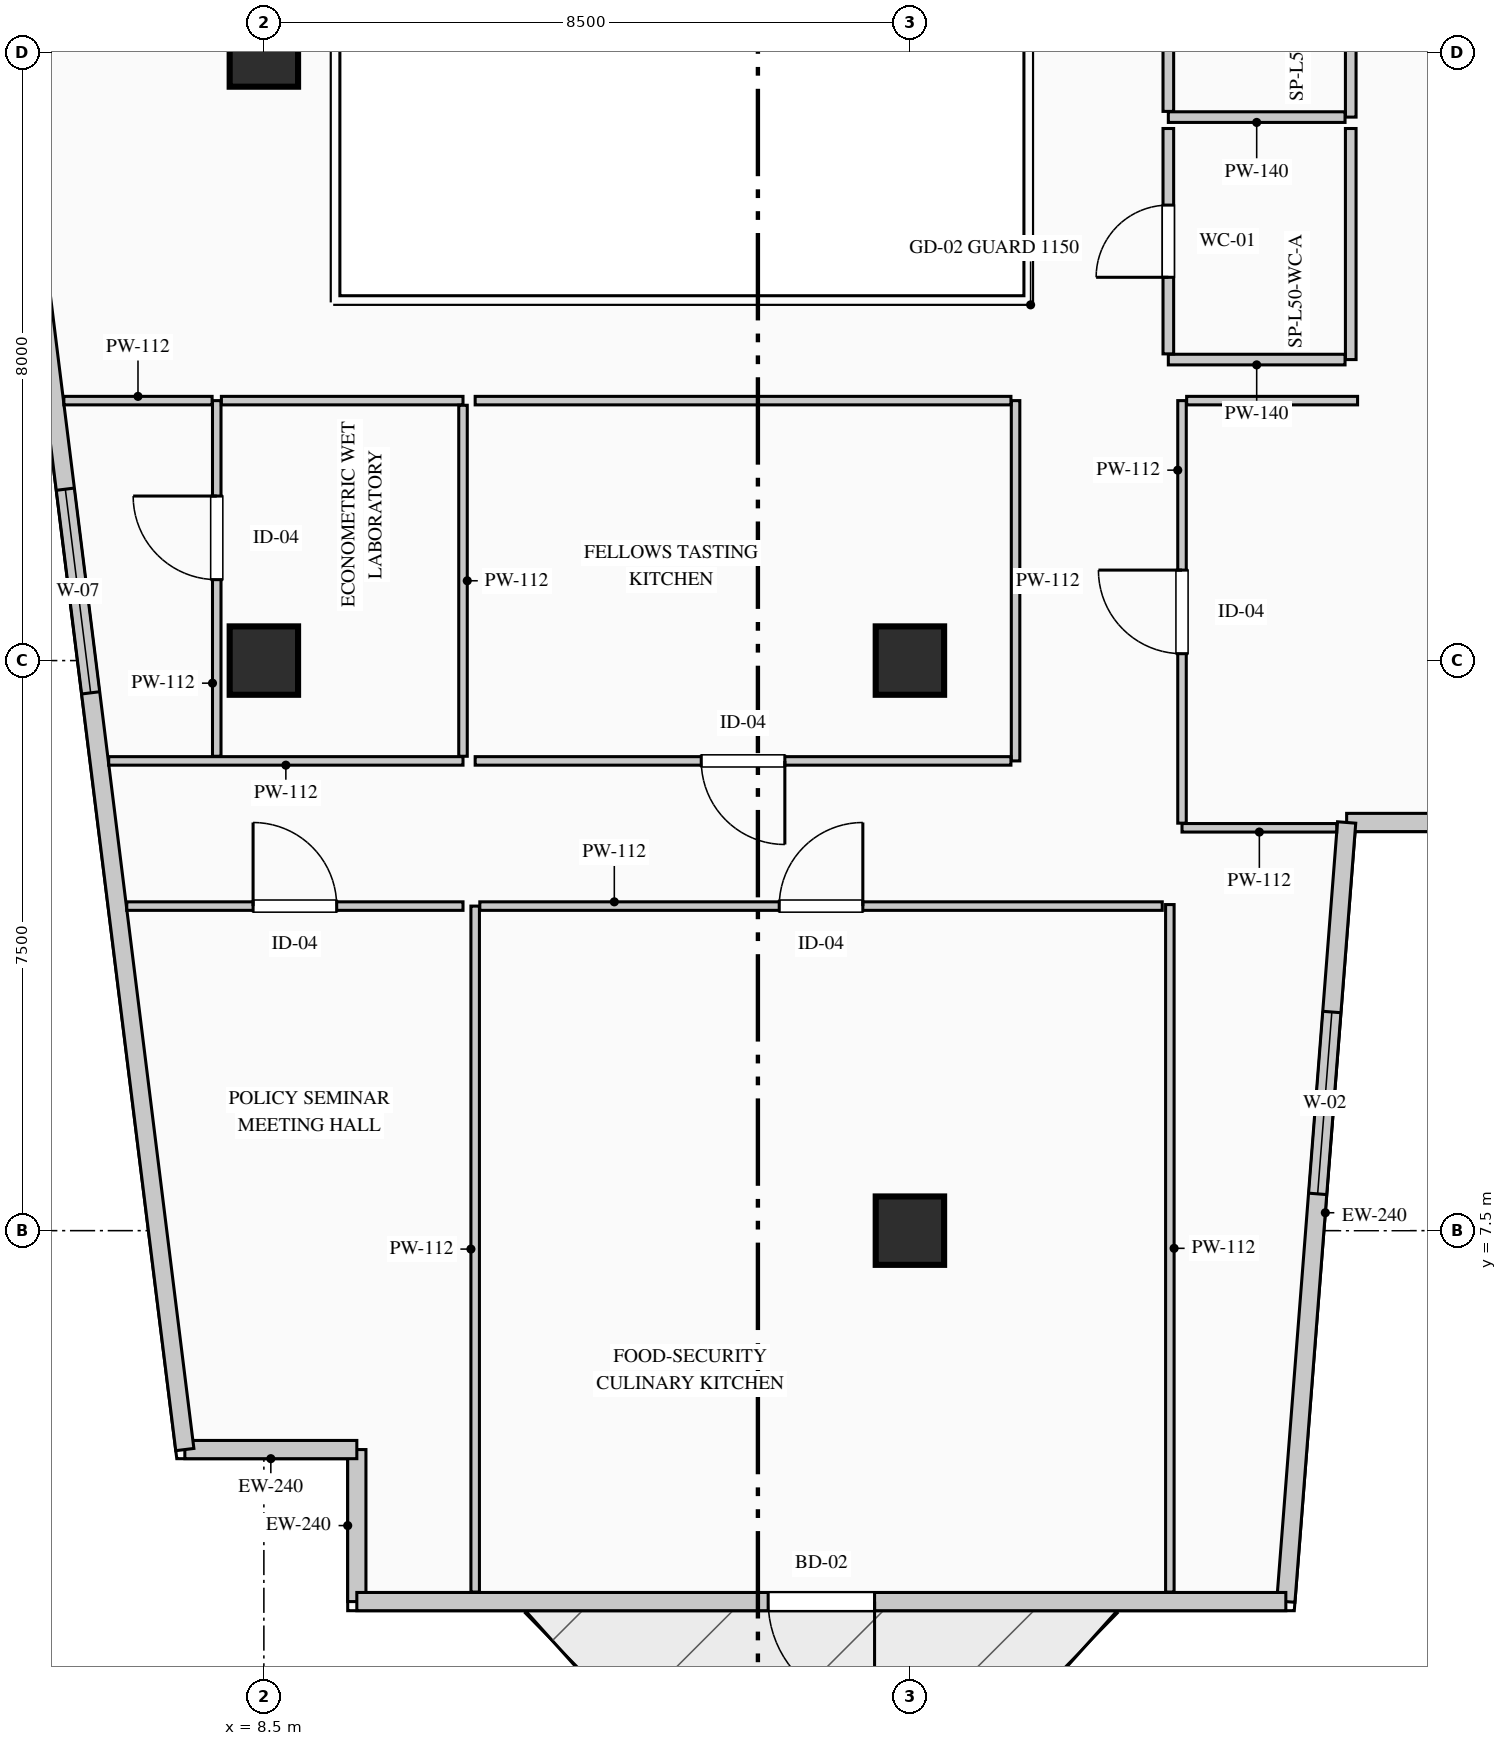
"""IFC4 building model, lengths in metres.
Left out: names, types, materials, properties, quantities, classifications, styles, units other than length and angle.
Written with IfcOpenShell. Run it as: python <this file> out.ifc"""

import sys

from ifc_helpers import new_model, si_unit, direction, frame, frame_2d, origin, origin_2d, place, context, subcontext, project, spatial, rectangle, extrude, element, fill, save


model = new_model("IFC4")
c1 = context("Model", 3, precision=1e-05, world=origin(), true_north=direction((0.0, 1.0)))
c2 = subcontext(c1, "Body", "Model", "MODEL_VIEW")
j1 = project(units=[si_unit("LENGTHUNIT", "METRE"), si_unit("PLANEANGLEUNIT", "RADIAN")], contexts=[c1])
p1 = place(None, origin())
s1 = spatial("IfcSite", under=j1, at=p1, CompositionType="ELEMENT")
p2 = place(p1, origin())
s2 = spatial("IfcBuilding", under=s1, at=p2, CompositionType="ELEMENT")
p3 = place(p2, frame((0.0, 0.0, 211.4)))
s3 = spatial("IfcBuildingStorey", under=s2, at=p3, CompositionType="ELEMENT", Elevation=211.4)
for number, where, z_axis, x_axis in (
    (1, (8.5, 15.0, 0.0), (0.0, 0.0, 1.0), (1.0, 0.0, 0.0)),
    (2, (8.5, 23.0, 0.0), (0.0, 0.0, 1.0), (1.0, 0.0, 0.0)),
    (3, (17.0, 7.5, 0.0), (0.0, 0.0, 1.0), (1.0, 0.0, 0.0)),
    (4, (17.0, 15.0, 0.0), (0.0, 0.0, 1.0), (1.0, 0.0, 0.0)),
):
    element("IfcColumn", number, at=place(p3, frame(where, z_axis=z_axis, x_axis=x_axis)), inside=s3, PredefinedType="COLUMN", context=c2, shape_type="SweptSolid", body=[
        extrude(rectangle(XDim=0.9, YDim=0.9, at=origin_2d()), origin(), (0.0, 0.0, 1.0), 3.95),
    ])
p4 = place(p3, frame((9.723, 2.62, 0.0), z_axis=(0.0, 0.0, 1.0), x_axis=(0.0, 1.0, 0.0)))
e5 = element("IfcWall", 5, at=p4, inside=s3, PredefinedType="STANDARD", context=c2, shape_type="SweptSolid", body=[
    extrude(rectangle(XDim=2.0, YDim=0.24, at=frame_2d((1.0, 0.0))), origin(), (0.0, 0.0, 1.0), 3.7),
])
p5 = place(p3, frame((9.723, 4.62, 0.0), z_axis=(0.0, 0.0, 1.0), x_axis=(-1.0, 0.0, 0.0)))
e6 = element("IfcWall", 6, at=p5, inside=s3, PredefinedType="STANDARD", context=c2, shape_type="SweptSolid", body=[
    extrude(rectangle(XDim=2.263, YDim=0.24, at=frame_2d((1.131, 0.0))), origin(), (0.0, 0.0, 1.0), 3.7),
])
p6 = place(p3, frame((7.46, 4.62, 0.0), z_axis=(0.0, 0.0, 1.0), x_axis=(-0.123515576323, 0.992342633573, 0.0)))
e7 = element("IfcWall", 7, at=p6, inside=s3, PredefinedType="STANDARD", context=c2, shape_type="SweptSolid", body=[
    extrude(rectangle(XDim=37.043, YDim=0.24, at=frame_2d((18.522, 0.0))), origin(), (0.0, 0.0, 1.0), 3.7),
])
p7 = place(p6, frame((10.032, 0.0, 0.9)))
e8 = element("IfcOpeningElement", 8, at=p7, cuts=e7, PredefinedType="OPENING", context=c2, shape_type="SweptSolid", body=[
    extrude(rectangle(XDim=2.7, YDim=2.1, at=frame_2d((1.35, 1.05))), frame((0.0, 0.13, 0.0), z_axis=(0.0, -1.0, 0.0), x_axis=(1.0, 0.0, 0.0)), (0.0, 0.0, 1.0), 0.26),
])
p8 = place(p3, frame((29.581, 12.87, 0.0), z_axis=(0.0, 0.0, 1.0), x_axis=(-1.0, 0.0, 0.0)))
e9 = element("IfcWall", 9, at=p8, inside=s3, PredefinedType="STANDARD", context=c2, shape_type="SweptSolid", body=[
    extrude(rectangle(XDim=6.834, YDim=0.24, at=frame_2d((3.417, 0.0))), origin(), (0.0, 0.0, 1.0), 3.7),
])
p9 = place(p8, frame((1.26, 0.0, 0.9)))
e10 = element("IfcOpeningElement", 10, at=p9, cuts=e9, PredefinedType="OPENING", context=c2, shape_type="SweptSolid", body=[
    extrude(rectangle(XDim=2.4, YDim=2.1, at=frame_2d((1.2, 1.05))), frame((0.0, 0.13, 0.0), z_axis=(0.0, -1.0, 0.0), x_axis=(1.0, 0.0, 0.0)), (0.0, 0.0, 1.0), 0.26),
])
p10 = place(p3, frame((22.746, 12.87, 0.0), z_axis=(0.0, 0.0, 1.0), x_axis=(-0.077816860153, -0.996967670627, 0.0)))
e11 = element("IfcWall", 11, at=p10, inside=s3, PredefinedType="STANDARD", context=c2, shape_type="SweptSolid", body=[
    extrude(rectangle(XDim=10.281, YDim=0.24, at=frame_2d((5.141, 0.0))), origin(), (0.0, 0.0, 1.0), 3.7),
])
p11 = place(p10, frame((2.501, 0.0, 0.9)))
e12 = element("IfcOpeningElement", 12, at=p11, cuts=e11, PredefinedType="OPENING", context=c2, shape_type="SweptSolid", body=[
    extrude(rectangle(XDim=2.4, YDim=2.1, at=frame_2d((1.2, 1.05))), frame((0.0, 0.13, 0.0), z_axis=(0.0, -1.0, 0.0), x_axis=(1.0, 0.0, 0.0)), (0.0, 0.0, 1.0), 0.26),
])
p12 = place(p3, frame((21.946, 2.62, 0.0), z_axis=(0.0, 0.0, 1.0), x_axis=(-1.0, 0.0, 0.0)))
e13 = element("IfcWall", 13, at=p12, inside=s3, PredefinedType="STANDARD", context=c2, shape_type="SweptSolid", body=[
    extrude(rectangle(XDim=12.223, YDim=0.24, at=frame_2d((6.112, 0.0))), origin(), (0.0, 0.0, 1.0), 3.7),
])
p13 = place(p12, frame((5.411, 0.0, 0.0)))
e14 = element("IfcOpeningElement", 14, at=p13, cuts=e13, PredefinedType="OPENING", context=c2, shape_type="SweptSolid", body=[
    extrude(rectangle(XDim=1.4, YDim=2.2, at=frame_2d((0.7, 1.1))), frame((0.0, 0.13, 0.0), z_axis=(0.0, -1.0, 0.0), x_axis=(1.0, 0.0, 0.0)), (0.0, 0.0, 1.0), 0.26),
])
p14 = place(p3, frame((22.8, 25.15, 0.0), z_axis=(0.0, 0.0, 1.0), x_axis=(0.0, -1.0, 0.0)))
e15 = element("IfcWall", 15, at=p14, inside=s3, PredefinedType="PARTITIONING", context=c2, shape_type="SweptSolid", body=[
    extrude(rectangle(XDim=3.0, YDim=0.14, at=frame_2d((1.5, 0.0))), origin(), (0.0, 0.0, 1.0), 3.325),
])
p15 = place(p3, frame((22.725, 22.15, 0.0), z_axis=(0.0, 0.0, 1.0), x_axis=(-1.0, 0.0, 0.0)))
e16 = element("IfcWall", 16, at=p15, inside=s3, PredefinedType="PARTITIONING", context=c2, shape_type="SweptSolid", body=[
    extrude(rectangle(XDim=2.325, YDim=0.14, at=frame_2d((1.163, 0.0))), origin(), (0.0, 0.0, 1.0), 3.7),
])
p16 = place(p3, frame((20.4, 22.225, 0.0), z_axis=(0.0, 0.0, 1.0), x_axis=(0.0, 1.0, 0.0)))
e17 = element("IfcWall", 17, at=p16, inside=s3, PredefinedType="PARTITIONING", context=c2, shape_type="SweptSolid", body=[
    extrude(rectangle(XDim=2.925, YDim=0.14, at=frame_2d((1.462, 0.0))), origin(), (0.0, 0.0, 1.0), 3.7),
])
p17 = place(p16, frame((0.988, 0.0, 0.0)))
e18 = element("IfcOpeningElement", 18, at=p17, cuts=e17, PredefinedType="OPENING", context=c2, shape_type="SweptSolid", body=[
    extrude(rectangle(XDim=0.95, YDim=2.15, at=frame_2d((0.475, 1.075))), frame((0.0, 0.08, 0.0), z_axis=(0.0, -1.0, 0.0), x_axis=(1.0, 0.0, 0.0)), (0.0, 0.0, 1.0), 0.16),
])
p18 = place(p3, frame((22.8, 22.0, 0.0), z_axis=(0.0, 0.0, 1.0), x_axis=(0.0, -1.0, 0.0)))
e19 = element("IfcWall", 19, at=p18, inside=s3, PredefinedType="PARTITIONING", context=c2, shape_type="SweptSolid", body=[
    extrude(rectangle(XDim=3.04, YDim=0.14, at=frame_2d((1.52, 0.0))), origin(), (0.0, 0.0, 1.0), 3.325),
])
p19 = place(p3, frame((22.725, 18.96, 0.0), z_axis=(0.0, 0.0, 1.0), x_axis=(-1.0, 0.0, 0.0)))
e20 = element("IfcWall", 20, at=p19, inside=s3, PredefinedType="PARTITIONING", context=c2, shape_type="SweptSolid", body=[
    extrude(rectangle(XDim=2.325, YDim=0.14, at=frame_2d((1.163, 0.0))), origin(), (0.0, 0.0, 1.0), 3.7),
])
p20 = place(p3, frame((20.4, 19.035, 0.0), z_axis=(0.0, 0.0, 1.0), x_axis=(0.0, 1.0, 0.0)))
e21 = element("IfcWall", 21, at=p20, inside=s3, PredefinedType="PARTITIONING", context=c2, shape_type="SweptSolid", body=[
    extrude(rectangle(XDim=2.965, YDim=0.14, at=frame_2d((1.482, 0.0))), origin(), (0.0, 0.0, 1.0), 3.7),
])
p21 = place(p20, frame((1.008, 0.0, 0.0)))
e22 = element("IfcOpeningElement", 22, at=p21, cuts=e21, PredefinedType="OPENING", context=c2, shape_type="SweptSolid", body=[
    extrude(rectangle(XDim=0.95, YDim=2.15, at=frame_2d((0.475, 1.075))), frame((0.0, 0.08, 0.0), z_axis=(0.0, -1.0, 0.0), x_axis=(1.0, 0.0, 0.0)), (0.0, 0.0, 1.0), 0.16),
])
p22 = place(p3, frame((11.28, 2.745, 0.0), z_axis=(0.0, 0.0, 1.0), x_axis=(0.0, 1.0, 0.0)))
e23 = element("IfcWall", 23, at=p22, inside=s3, PredefinedType="PARTITIONING", context=c2, shape_type="SweptSolid", body=[
    extrude(rectangle(XDim=9.025, YDim=0.112, at=frame_2d((4.512, 0.0))), origin(), (0.0, 0.0, 1.0), 3.7),
])
p23 = place(p3, frame((11.341, 11.77, 0.0), z_axis=(0.0, 0.0, 1.0), x_axis=(1.0, 0.0, 0.0)))
e24 = element("IfcWall", 24, at=p23, inside=s3, PredefinedType="PARTITIONING", context=c2, shape_type="SweptSolid", body=[
    extrude(rectangle(XDim=8.979, YDim=0.112, at=frame_2d((4.49, 0.0))), origin(), (0.0, 0.0, 1.0), 3.7),
])
p24 = place(p23, frame((3.939, 0.0, 0.0)))
e25 = element("IfcOpeningElement", 25, at=p24, cuts=e24, PredefinedType="OPENING", context=c2, shape_type="SweptSolid", body=[
    extrude(rectangle(XDim=1.1, YDim=2.2, at=frame_2d((0.55, 1.1))), frame((0.0, 0.066, 0.0), z_axis=(0.0, -1.0, 0.0), x_axis=(1.0, 0.0, 0.0)), (0.0, 0.0, 1.0), 0.132),
])
p25 = place(p3, frame((20.42, 11.79, 0.0), z_axis=(0.0, 0.0, 1.0), x_axis=(0.0, -1.0, 0.0)))
e26 = element("IfcWall", 26, at=p25, inside=s3, PredefinedType="PARTITIONING", context=c2, shape_type="SweptSolid", body=[
    extrude(rectangle(XDim=9.045, YDim=0.112, at=frame_2d((4.522, 0.0))), origin(), (0.0, 0.0, 1.0), 3.7),
])
p26 = place(p3, frame((6.696, 11.77, 0.0), z_axis=(0.0, 0.0, 1.0), x_axis=(1.0, 0.0, 0.0)))
e27 = element("IfcWall", 27, at=p26, inside=s3, PredefinedType="PARTITIONING", context=c2, shape_type="SweptSolid", body=[
    extrude(rectangle(XDim=4.424, YDim=0.112, at=frame_2d((2.212, 0.0))), origin(), (0.0, 0.0, 1.0), 3.7),
])
p27 = place(p26, frame((1.662, 0.0, 0.0)))
e28 = element("IfcOpeningElement", 28, at=p27, cuts=e27, PredefinedType="OPENING", context=c2, shape_type="SweptSolid", body=[
    extrude(rectangle(XDim=1.1, YDim=2.2, at=frame_2d((0.55, 1.1))), frame((0.0, 0.066, 0.0), z_axis=(0.0, -1.0, 0.0), x_axis=(1.0, 0.0, 0.0)), (0.0, 0.0, 1.0), 0.132),
])
p28 = place(p3, frame((11.12, 13.68, 0.0), z_axis=(0.0, 0.0, 1.0), x_axis=(-1.0, 0.0, 0.0)))
e29 = element("IfcWall", 29, at=p28, inside=s3, PredefinedType="PARTITIONING", context=c2, shape_type="SweptSolid", body=[
    extrude(rectangle(XDim=4.662, YDim=0.112, at=frame_2d((2.331, 0.0))), origin(), (0.0, 0.0, 1.0), 3.7),
])
p29 = place(p3, frame((7.88, 13.741, 0.0), z_axis=(0.0, 0.0, 1.0), x_axis=(0.0, 1.0, 0.0)))
e30 = element("IfcWall", 30, at=p29, inside=s3, PredefinedType="PARTITIONING", context=c2, shape_type="SweptSolid", body=[
    extrude(rectangle(XDim=4.679, YDim=0.112, at=frame_2d((2.339, 0.0))), origin(), (0.0, 0.0, 1.0), 3.7),
])
p30 = place(p29, frame((2.324, 0.0, 0.0)))
e31 = element("IfcOpeningElement", 31, at=p30, cuts=e30, PredefinedType="OPENING", context=c2, shape_type="SweptSolid", body=[
    extrude(rectangle(XDim=1.1, YDim=2.2, at=frame_2d((0.55, 1.1))), frame((0.0, 0.066, 0.0), z_axis=(0.0, -1.0, 0.0), x_axis=(1.0, 0.0, 0.0)), (0.0, 0.0, 1.0), 0.132),
])
p31 = place(p3, frame((5.868, 18.42, 0.0), z_axis=(0.0, 0.0, 1.0), x_axis=(1.0, 0.0, 0.0)))
e32 = element("IfcWall", 32, at=p31, inside=s3, PredefinedType="PARTITIONING", context=c2, shape_type="SweptSolid", body=[
    extrude(rectangle(XDim=1.951, YDim=0.112, at=frame_2d((0.975, 0.0))), origin(), (0.0, 0.0, 1.0), 3.7),
])
p32 = place(p3, frame((7.941, 18.42, 0.0), z_axis=(0.0, 0.0, 1.0), x_axis=(1.0, 0.0, 0.0)))
e33 = element("IfcWall", 33, at=p32, inside=s3, PredefinedType="PARTITIONING", context=c2, shape_type="SweptSolid", body=[
    extrude(rectangle(XDim=3.179, YDim=0.112, at=frame_2d((1.59, 0.0))), origin(), (0.0, 0.0, 1.0), 3.7),
])
p33 = place(p3, frame((11.12, 18.359, 0.0), z_axis=(0.0, 0.0, 1.0), x_axis=(0.0, -1.0, 0.0)))
e34 = element("IfcWall", 34, at=p33, inside=s3, PredefinedType="PARTITIONING", context=c2, shape_type="SweptSolid", body=[
    extrude(rectangle(XDim=4.618, YDim=0.112, at=frame_2d((2.309, 0.0))), origin(), (0.0, 0.0, 1.0), 3.7),
])
p34 = place(p3, frame((18.39, 18.42, 0.0), z_axis=(0.0, 0.0, 1.0), x_axis=(0.0, -1.0, 0.0)))
e35 = element("IfcWall", 35, at=p34, inside=s3, PredefinedType="PARTITIONING", context=c2, shape_type="SweptSolid", body=[
    extrude(rectangle(XDim=4.74, YDim=0.112, at=frame_2d((2.37, 0.0))), origin(), (0.0, 0.0, 1.0), 3.7),
])
p35 = place(p3, frame((18.329, 13.68, 0.0), z_axis=(0.0, 0.0, 1.0), x_axis=(-1.0, 0.0, 0.0)))
e36 = element("IfcWall", 36, at=p35, inside=s3, PredefinedType="PARTITIONING", context=c2, shape_type="SweptSolid", body=[
    extrude(rectangle(XDim=7.049, YDim=0.112, at=frame_2d((3.524, 0.0))), origin(), (0.0, 0.0, 1.0), 3.7),
])
p36 = place(p35, frame((2.975, 0.0, 0.0)))
e37 = element("IfcOpeningElement", 37, at=p36, cuts=e36, PredefinedType="OPENING", context=c2, shape_type="SweptSolid", body=[
    extrude(rectangle(XDim=1.1, YDim=2.2, at=frame_2d((0.55, 1.1))), frame((0.0, 0.066, 0.0), z_axis=(0.0, -1.0, 0.0), x_axis=(1.0, 0.0, 0.0)), (0.0, 0.0, 1.0), 0.132),
])
p37 = place(p3, frame((11.28, 18.42, 0.0), z_axis=(0.0, 0.0, 1.0), x_axis=(1.0, 0.0, 0.0)))
e38 = element("IfcWall", 38, at=p37, inside=s3, PredefinedType="PARTITIONING", context=c2, shape_type="SweptSolid", body=[
    extrude(rectangle(XDim=7.049, YDim=0.112, at=frame_2d((3.524, 0.0))), origin(), (0.0, 0.0, 1.0), 3.7),
])
p38 = place(p3, frame((22.615, 12.8, 0.0), z_axis=(0.0, 0.0, 1.0), x_axis=(-1.0, 0.0, 0.0)))
e39 = element("IfcWall", 39, at=p38, inside=s3, PredefinedType="PARTITIONING", context=c2, shape_type="SweptSolid", body=[
    extrude(rectangle(XDim=2.035, YDim=0.112, at=frame_2d((1.018, 0.0))), origin(), (0.0, 0.0, 1.0), 3.7),
])
p39 = place(p3, frame((20.58, 12.861, 0.0), z_axis=(0.0, 0.0, 1.0), x_axis=(0.0, 1.0, 0.0)))
e40 = element("IfcWall", 40, at=p39, inside=s3, PredefinedType="PARTITIONING", context=c2, shape_type="SweptSolid", body=[
    extrude(rectangle(XDim=5.559, YDim=0.112, at=frame_2d((2.779, 0.0))), origin(), (0.0, 0.0, 1.0), 3.7),
])
p40 = place(p39, frame((2.229, 0.0, 0.0)))
e41 = element("IfcOpeningElement", 41, at=p40, cuts=e40, PredefinedType="OPENING", context=c2, shape_type="SweptSolid", body=[
    extrude(rectangle(XDim=1.1, YDim=2.2, at=frame_2d((0.55, 1.1))), frame((0.0, 0.066, 0.0), z_axis=(0.0, -1.0, 0.0), x_axis=(1.0, 0.0, 0.0)), (0.0, 0.0, 1.0), 0.132),
])
p41 = place(p3, frame((20.641, 18.42, 0.0), z_axis=(0.0, 0.0, 1.0), x_axis=(1.0, 0.0, 0.0)))
e42 = element("IfcWall", 42, at=p41, inside=s3, PredefinedType="PARTITIONING", context=c2, shape_type="SweptSolid", body=[
    extrude(rectangle(XDim=2.249, YDim=0.112, at=frame_2d((1.125, 0.0))), origin(), (0.0, 0.0, 1.0), 3.7),
])
p42 = place(p7, origin())
e43 = element("IfcWindow", 43, at=p42, inside=s3, PartitioningType="DOUBLE_PANEL_VERTICAL", PredefinedType="WINDOW", context=c2, shape_type="SweptSolid", body=[
    extrude(rectangle(XDim=2.7, YDim=2.1, at=frame_2d((1.35, 1.05))), frame((0.0, 0.03, 0.0), z_axis=(0.0, -1.0, 0.0), x_axis=(1.0, 0.0, 0.0)), (0.0, 0.0, 1.0), 0.06),
])
fill(e8, e43)
p43 = place(p11, origin())
e44 = element("IfcWindow", 44, at=p43, inside=s3, PartitioningType="DOUBLE_PANEL_VERTICAL", PredefinedType="WINDOW", context=c2, shape_type="SweptSolid", body=[
    extrude(rectangle(XDim=2.4, YDim=2.1, at=frame_2d((1.2, 1.05))), frame((0.0, 0.03, 0.0), z_axis=(0.0, -1.0, 0.0), x_axis=(1.0, 0.0, 0.0)), (0.0, 0.0, 1.0), 0.06),
])
fill(e12, e44)
p44 = place(p13, origin())
e45 = element("IfcDoor", 45, at=p44, inside=s3, OperationType="SINGLE_SWING_LEFT", PredefinedType="DOOR", context=c2, shape_type="SweptSolid", body=[
    extrude(rectangle(XDim=1.4, YDim=2.2, at=frame_2d((0.7, 1.1))), frame((0.0, 0.025, 0.0), z_axis=(0.0, -1.0, 0.0), x_axis=(1.0, 0.0, 0.0)), (0.0, 0.0, 1.0), 0.05),
])
fill(e14, e45)
p45 = place(p21, origin())
e46 = element("IfcDoor", 46, at=p45, inside=s3, OperationType="SINGLE_SWING_LEFT", PredefinedType="DOOR", context=c2, shape_type="SweptSolid", body=[
    extrude(rectangle(XDim=0.95, YDim=2.15, at=frame_2d((0.475, 1.075))), frame((0.0, 0.025, 0.0), z_axis=(0.0, -1.0, 0.0), x_axis=(1.0, 0.0, 0.0)), (0.0, 0.0, 1.0), 0.05),
])
fill(e22, e46)
p46 = place(p24, origin())
e47 = element("IfcDoor", 47, at=p46, inside=s3, OperationType="SINGLE_SWING_RIGHT", PredefinedType="DOOR", context=c2, shape_type="SweptSolid", body=[
    extrude(rectangle(XDim=1.1, YDim=2.2, at=frame_2d((0.55, 1.1))), frame((0.0, 0.025, 0.0), z_axis=(0.0, -1.0, 0.0), x_axis=(1.0, 0.0, 0.0)), (0.0, 0.0, 1.0), 0.05),
])
fill(e25, e47)
p47 = place(p27, origin())
e48 = element("IfcDoor", 48, at=p47, inside=s3, OperationType="SINGLE_SWING_LEFT", PredefinedType="DOOR", context=c2, shape_type="SweptSolid", body=[
    extrude(rectangle(XDim=1.1, YDim=2.2, at=frame_2d((0.55, 1.1))), frame((0.0, 0.025, 0.0), z_axis=(0.0, -1.0, 0.0), x_axis=(1.0, 0.0, 0.0)), (0.0, 0.0, 1.0), 0.05),
])
fill(e28, e48)
p48 = place(p30, origin())
e49 = element("IfcDoor", 49, at=p48, inside=s3, OperationType="SINGLE_SWING_RIGHT", PredefinedType="DOOR", context=c2, shape_type="SweptSolid", body=[
    extrude(rectangle(XDim=1.1, YDim=2.2, at=frame_2d((0.55, 1.1))), frame((0.0, 0.025, 0.0), z_axis=(0.0, -1.0, 0.0), x_axis=(1.0, 0.0, 0.0)), (0.0, 0.0, 1.0), 0.05),
])
fill(e31, e49)
p49 = place(p36, origin())
e50 = element("IfcDoor", 50, at=p49, inside=s3, OperationType="SINGLE_SWING_LEFT", PredefinedType="DOOR", context=c2, shape_type="SweptSolid", body=[
    extrude(rectangle(XDim=1.1, YDim=2.2, at=frame_2d((0.55, 1.1))), frame((0.0, 0.025, 0.0), z_axis=(0.0, -1.0, 0.0), x_axis=(1.0, 0.0, 0.0)), (0.0, 0.0, 1.0), 0.05),
])
fill(e37, e50)
p50 = place(p40, origin())
e51 = element("IfcDoor", 51, at=p50, inside=s3, OperationType="SINGLE_SWING_RIGHT", PredefinedType="DOOR", context=c2, shape_type="SweptSolid", body=[
    extrude(rectangle(XDim=1.1, YDim=2.2, at=frame_2d((0.55, 1.1))), frame((0.0, 0.025, 0.0), z_axis=(0.0, -1.0, 0.0), x_axis=(1.0, 0.0, 0.0)), (0.0, 0.0, 1.0), 0.05),
])
fill(e41, e51)
save(model, sys.argv[1])
